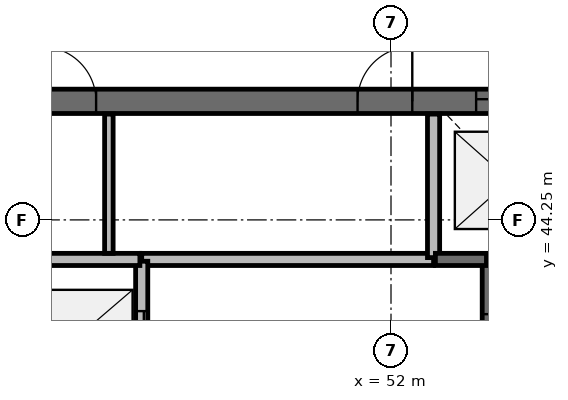
"""IFC4 building model, lengths in metres.
Left out: names, types, materials, properties, quantities, classifications, styles, units other than length and angle.
Written with IfcOpenShell. Run it as: python <this file> out.ifc"""

import sys

from ifc_helpers import new_model, si_unit, direction, frame, frame_2d, origin, place, context, subcontext, project, spatial, rectangle, extrude, source, transform, mapped, element, fill, save


model = new_model("IFC4")
c1 = context("Model", 3, precision=1e-05, world=origin(), true_north=direction((0.0, 1.0)))
c2 = subcontext(c1, "Body", "Model", "MODEL_VIEW")
j1 = project(units=[si_unit("LENGTHUNIT", "METRE"), si_unit("PLANEANGLEUNIT", "RADIAN")], contexts=[c1])
p1 = place(None, origin())
s1 = spatial("IfcSite", under=j1, at=p1, CompositionType="ELEMENT")
p2 = place(p1, origin())
s2 = spatial("IfcBuilding", under=s1, at=p2, CompositionType="ELEMENT")
p3 = place(p2, frame((0.0, 0.0, 176.0)))
s3 = spatial("IfcBuildingStorey", under=s2, at=p3, CompositionType="ELEMENT", Elevation=176.0)
p4 = place(p3, frame((43.8, 46.2, 0.0), z_axis=(0.0, 0.0, 1.0), x_axis=(1.0, 0.0, 0.0)))
e1 = element("IfcWall", 1, at=p4, inside=s3, PredefinedType="SHEAR", context=c2, shape_type="SweptSolid", body=[
    extrude(rectangle(XDim=16.4, YDim=0.4, at=frame_2d((8.2, 0.0))), origin(), (0.0, 0.0, 1.0), 3.9),
])
p5 = place(p4, frame((9.6, 0.0, 0.0)))
e2 = element("IfcOpeningElement", 2, at=p5, cuts=e1, PredefinedType="OPENING", context=c2, shape_type="SweptSolid", body=[
    extrude(rectangle(XDim=1.1, YDim=2.1, at=frame_2d((0.55, 1.05))), frame((0.0, 0.21, 0.0), z_axis=(0.0, -1.0, 0.0), x_axis=(1.0, 0.0, 0.0)), (0.0, 0.0, 1.0), 0.42),
])
p6 = place(p4, frame((12.1, 0.0, 0.0)))
e3 = element("IfcOpeningElement", 3, at=p6, cuts=e1, PredefinedType="OPENING", context=c2, shape_type="SweptSolid", body=[
    extrude(rectangle(XDim=1.1, YDim=2.1, at=frame_2d((0.55, 1.05))), frame((0.0, 0.21, 0.0), z_axis=(0.0, -1.0, 0.0), x_axis=(1.0, 0.0, 0.0)), (0.0, 0.0, 1.0), 0.42),
])
p7 = place(p4, frame((14.6, 0.0, 0.0)))
e4 = element("IfcOpeningElement", 4, at=p7, cuts=e1, PredefinedType="OPENING", context=c2, shape_type="SweptSolid", body=[
    extrude(rectangle(XDim=1.1, YDim=2.1, at=frame_2d((0.55, 1.05))), frame((0.0, 0.21, 0.0), z_axis=(0.0, -1.0, 0.0), x_axis=(1.0, 0.0, 0.0)), (0.0, 0.0, 1.0), 0.42),
])
p8 = place(p4, frame((2.45, 0.0, 0.0)))
e5 = element("IfcOpeningElement", 5, at=p8, cuts=e1, PredefinedType="OPENING", context=c2, shape_type="SweptSolid", body=[
    extrude(rectangle(XDim=0.9, YDim=2.1, at=frame_2d((0.45, 1.05))), frame((0.0, 0.21, 0.0), z_axis=(0.0, -1.0, 0.0), x_axis=(1.0, 0.0, 0.0)), (0.0, 0.0, 1.0), 0.42),
])
p9 = place(p4, frame((7.65, 0.0, 0.0)))
e6 = element("IfcOpeningElement", 6, at=p9, cuts=e1, PredefinedType="OPENING", context=c2, shape_type="SweptSolid", body=[
    extrude(rectangle(XDim=0.9, YDim=2.1, at=frame_2d((0.45, 1.05))), frame((0.0, 0.21, 0.0), z_axis=(0.0, -1.0, 0.0), x_axis=(1.0, 0.0, 0.0)), (0.0, 0.0, 1.0), 0.42),
])
p10 = place(p3, frame((52.7, 43.6, 0.0), z_axis=(0.0, 0.0, 1.0), x_axis=(-1.0, 0.0, 0.0)))
e7 = element("IfcWall", 7, at=p10, inside=s3, PredefinedType="SOLIDWALL", context=c2, shape_type="SweptSolid", body=[
    extrude(rectangle(XDim=4.8, YDim=0.2, at=frame_2d((2.4, 0.0))), origin(), (0.0, 0.0, 1.0), 3.4),
])
p11 = place(p3, frame((47.9, 40.82, 0.0), z_axis=(0.0, 0.0, 1.0), x_axis=(0.0, 1.0, 0.0)))
e8 = element("IfcWall", 8, at=p11, inside=s3, PredefinedType="SOLIDWALL", context=c2, shape_type="SweptSolid", body=[
    extrude(rectangle(XDim=2.75, YDim=0.2, at=frame_2d((1.375, 0.0))), origin(), (0.0, 0.0, 1.0), 3.4),
])
p12 = place(p11, frame((0.83, 0.0, 0.0)))
e9 = element("IfcOpeningElement", 9, at=p12, cuts=e8, PredefinedType="OPENING", context=c2, shape_type="SweptSolid", body=[
    extrude(rectangle(XDim=1.1, YDim=2.1, at=frame_2d((0.55, 1.05))), frame((0.0, 0.11, 0.0), z_axis=(0.0, -1.0, 0.0), x_axis=(1.0, 0.0, 0.0)), (0.0, 0.0, 1.0), 0.22),
])
p13 = place(p3, frame((53.6, 43.6, 0.0), z_axis=(0.0, 0.0, 1.0), x_axis=(0.0, -1.0, 0.0)))
e10 = element("IfcWall", 10, at=p13, inside=s3, PredefinedType="SOLIDWALL", context=c2, shape_type="SweptSolid", body=[
    extrude(rectangle(XDim=2.78, YDim=0.2, at=frame_2d((1.39, 0.0))), origin(), (0.0, 0.0, 1.0), 3.4),
])
p14 = place(p13, frame((0.9, 0.0, 0.0)))
e11 = element("IfcOpeningElement", 11, at=p14, cuts=e10, PredefinedType="OPENING", context=c2, shape_type="SweptSolid", body=[
    extrude(rectangle(XDim=1.0, YDim=2.1, at=frame_2d((0.5, 1.05))), frame((0.0, 0.11, 0.0), z_axis=(0.0, -1.0, 0.0), x_axis=(1.0, 0.0, 0.0)), (0.0, 0.0, 1.0), 0.22),
])
p15 = place(p3, frame((47.87, 43.6, 0.0), z_axis=(0.0, 0.0, 1.0), x_axis=(-1.0, 0.0, 0.0)))
e12 = element("IfcWall", 12, at=p15, inside=s3, PredefinedType="SOLIDWALL", context=c2, shape_type="SweptSolid", body=[
    extrude(rectangle(XDim=2.34, YDim=0.2, at=frame_2d((1.17, 0.0))), origin(), (0.0, 0.0, 1.0), 3.4),
])
p16 = place(p3, frame((52.7, 45.99, 0.0), z_axis=(0.0, 0.0, 1.0), x_axis=(0.0, -1.0, 0.0)))
e13 = element("IfcWall", 13, at=p16, inside=s3, PredefinedType="SOLIDWALL", context=c2, shape_type="SweptSolid", body=[
    extrude(rectangle(XDim=2.36, YDim=0.2, at=frame_2d((1.18, 0.0))), origin(), (0.0, 0.0, 1.0), 3.4),
])
p17 = place(p3, frame((52.73, 43.6, 0.0), z_axis=(0.0, 0.0, 1.0), x_axis=(1.0, 0.0, 0.0)))
e14 = element("IfcWall", 14, at=p17, inside=s3, PredefinedType="SOLIDWALL", context=c2, shape_type="SweptSolid", body=[
    extrude(rectangle(XDim=0.84, YDim=0.2, at=frame_2d((0.42, 0.0))), origin(), (0.0, 0.0, 1.0), 3.4),
])
p18 = place(p3, frame((47.36, 43.7, 0.0), z_axis=(0.0, 0.0, 1.0), x_axis=(0.0, 1.0, 0.0)))
e15 = element("IfcWall", 15, at=p18, inside=s3, PredefinedType="PARTITIONING", context=c2, shape_type="SweptSolid", body=[
    extrude(rectangle(XDim=2.29, YDim=0.14, at=frame_2d((1.145, 0.0))), origin(), (0.0, 0.0, 1.0), 2.7),
])
m1 = source(origin(), c2, "Body", "SweptSolid", [
    extrude(rectangle(XDim=1.1, YDim=2.1, at=frame_2d((0.55, 1.05))), frame((0.0, 0.025, 0.0), z_axis=(0.0, -1.0, 0.0), x_axis=(1.0, 0.0, 0.0)), (0.0, 0.0, 1.0), 0.05),
])
p19 = place(p5, origin())
e16 = element("IfcDoor", 16, at=p19, inside=s3, OperationType="DOUBLE_DOOR_SLIDING", PredefinedType="USERDEFINED", context=c2, shape_type="MappedRepresentation", body=[
    mapped(m1, transform((0.0, 0.0, 0.0), scale=1.0)),
])
fill(e2, e16)
p20 = place(p12, origin())
e17 = element("IfcDoor", 17, at=p20, inside=s3, OperationType="DOUBLE_DOOR_SLIDING", PredefinedType="USERDEFINED", context=c2, shape_type="MappedRepresentation", body=[
    mapped(m1, transform((0.0, 0.0, 0.0), scale=1.0)),
])
fill(e9, e17)
m2 = source(origin(), c2, "Body", "SweptSolid", [
    extrude(rectangle(XDim=1.0, YDim=2.1, at=frame_2d((0.5, 1.05))), frame((0.0, 0.025, 0.0), z_axis=(0.0, -1.0, 0.0), x_axis=(1.0, 0.0, 0.0)), (0.0, 0.0, 1.0), 0.05),
])
p21 = place(p14, origin())
e18 = element("IfcDoor", 18, at=p21, inside=s3, OperationType="SINGLE_SWING_LEFT", PredefinedType="DOOR", context=c2, shape_type="MappedRepresentation", body=[
    mapped(m2, transform((0.0, 0.0, 0.0), scale=1.0)),
])
fill(e11, e18)
m3 = source(origin(), c2, "Body", "SweptSolid", [
    extrude(rectangle(XDim=0.9, YDim=2.1, at=frame_2d((0.45, 1.05))), frame((0.0, 0.025, 0.0), z_axis=(0.0, -1.0, 0.0), x_axis=(1.0, 0.0, 0.0)), (0.0, 0.0, 1.0), 0.05),
])
p22 = place(p8, origin())
e19 = element("IfcDoor", 19, at=p22, inside=s3, OperationType="SINGLE_SWING_LEFT", PredefinedType="DOOR", context=c2, shape_type="MappedRepresentation", body=[
    mapped(m3, transform((0.0, 0.0, 0.0), scale=1.0)),
])
fill(e5, e19)
p23 = place(p9, origin())
e20 = element("IfcDoor", 20, at=p23, inside=s3, OperationType="SINGLE_SWING_RIGHT", PredefinedType="DOOR", context=c2, shape_type="MappedRepresentation", body=[
    mapped(m3, transform((0.0, 0.0, 0.0), scale=1.0)),
])
fill(e6, e20)
save(model, sys.argv[1])
